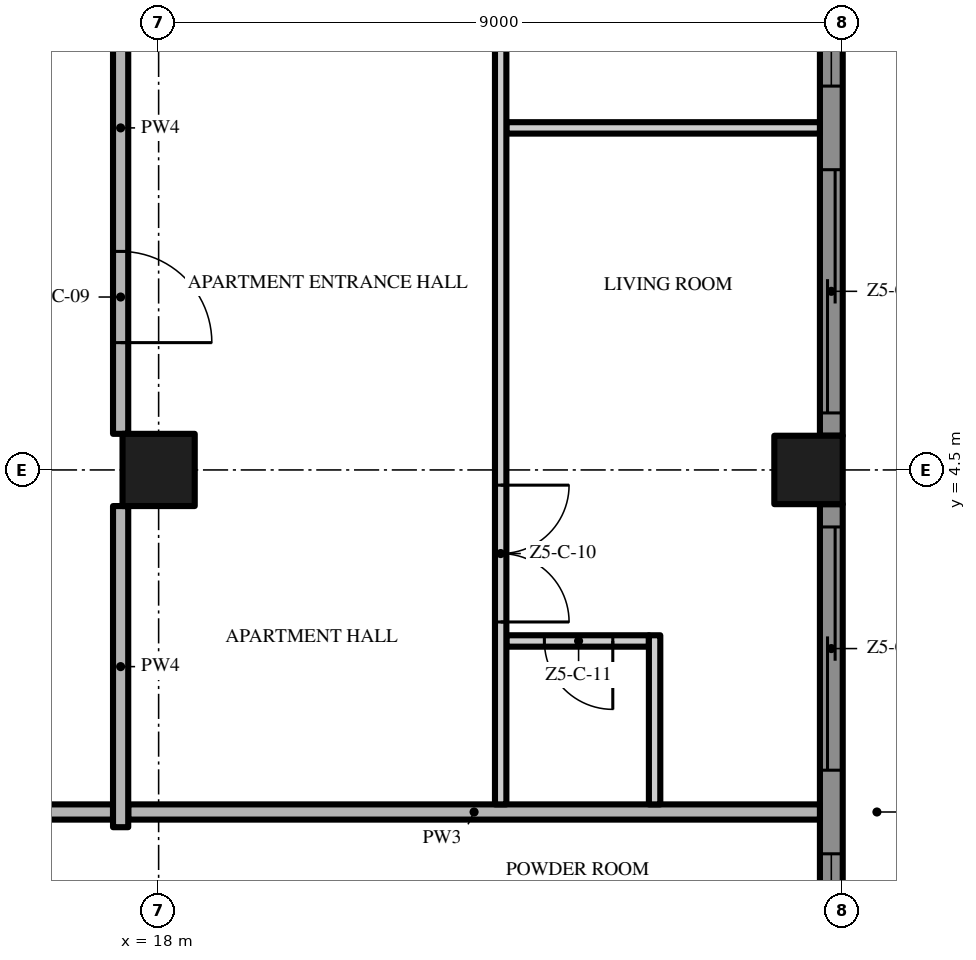
"""IFC4 building model, lengths in metres.
Left out: names, types, materials, properties, quantities, classifications, styles, units other than length and angle.
Written with IfcOpenShell. Run it as: python <this file> out.ifc"""

import sys

from ifc_helpers import new_model, si_unit, direction, frame, frame_2d, origin, origin_2d, place, context, subcontext, project, spatial, polyline, rectangle, outline, extrude, element, fill, save


model = new_model("IFC4")
c1 = context("Model", 3, precision=1e-05, world=origin(), true_north=direction((0.0, 1.0)))
c2 = subcontext(c1, "Body", "Model", "MODEL_VIEW")
j1 = project(units=[si_unit("LENGTHUNIT", "METRE"), si_unit("PLANEANGLEUNIT", "RADIAN")], contexts=[c1])
p1 = place(None, origin())
s1 = spatial("IfcSite", under=j1, at=p1, CompositionType="ELEMENT")
p2 = place(p1, origin())
s2 = spatial("IfcBuilding", under=s1, at=p2, CompositionType="ELEMENT")
p3 = place(p2, frame((0.0, 0.0, 265.4)))
s3 = spatial("IfcBuildingStorey", under=s2, at=p3, CompositionType="ELEMENT", Elevation=265.4)
p4 = place(p3, frame((18.0, 4.5, 0.0), z_axis=(0.0, 0.0, 1.0), x_axis=(1.0, 0.0, 0.0)))
e1 = element("IfcColumn", 1, at=p4, inside=s3, PredefinedType="COLUMN", context=c2, shape_type="SweptSolid", body=[
    extrude(rectangle(XDim=0.95, YDim=0.95, at=origin_2d()), origin(), (0.0, 0.0, 1.0), 3.5),
])
p5 = place(p3, frame((26.55, 4.5, 0.0), z_axis=(0.0, 0.0, 1.0), x_axis=(1.0, 0.0, 0.0)))
e2 = element("IfcColumn", 2, at=p5, inside=s3, PredefinedType="COLUMN", context=c2, shape_type="SweptSolid", body=[
    extrude(rectangle(XDim=0.9, YDim=0.9, at=origin_2d()), origin(), (0.0, 0.0, 1.0), 3.5),
])
p6 = place(p3, frame((26.85, 4.05, 0.0), z_axis=(0.0, 0.0, 1.0), x_axis=(0.0, -1.0, 0.0)))
e3 = element("IfcWall", 3, at=p6, inside=s3, PredefinedType="SOLIDWALL", context=c2, shape_type="SweptSolid", body=[
    extrude(rectangle(XDim=8.1, YDim=0.3, at=frame_2d((4.05, 0.0))), origin(), (0.0, 0.0, 1.0), 3.5),
])
p7 = place(p6, frame((4.6, 0.0, 0.45)))
e4 = element("IfcOpeningElement", 4, at=p7, cuts=e3, PredefinedType="OPENING", context=c2, shape_type="SweptSolid", body=[
    extrude(rectangle(XDim=3.2, YDim=2.65, at=frame_2d((1.6, 1.325))), frame((0.0, 0.16, 0.0), z_axis=(0.0, -1.0, 0.0), x_axis=(1.0, 0.0, 0.0)), (0.0, 0.0, 1.0), 0.32),
])
p8 = place(p6, frame((0.3, 0.0, 0.0)))
e5 = element("IfcOpeningElement", 5, at=p8, cuts=e3, PredefinedType="OPENING", context=c2, shape_type="SweptSolid", body=[
    extrude(rectangle(XDim=3.2, YDim=2.4, at=frame_2d((1.6, 1.2))), frame((0.0, 0.16, 0.0), z_axis=(0.0, -1.0, 0.0), x_axis=(1.0, 0.0, 0.0)), (0.0, 0.0, 1.0), 0.32),
])
p9 = place(p3, frame((26.85, 13.05, 0.0), z_axis=(0.0, 0.0, 1.0), x_axis=(0.0, -1.0, 0.0)))
e6 = element("IfcWall", 6, at=p9, inside=s3, PredefinedType="SOLIDWALL", context=c2, shape_type="SweptSolid", body=[
    extrude(rectangle(XDim=8.1, YDim=0.3, at=frame_2d((4.05, 0.0))), origin(), (0.0, 0.0, 1.0), 3.5),
])
p10 = place(p9, frame((4.6, 0.0, 0.0)))
e7 = element("IfcOpeningElement", 7, at=p10, cuts=e6, PredefinedType="OPENING", context=c2, shape_type="SweptSolid", body=[
    extrude(rectangle(XDim=3.2, YDim=2.4, at=frame_2d((1.6, 1.2))), frame((0.0, 0.16, 0.0), z_axis=(0.0, -1.0, 0.0), x_axis=(1.0, 0.0, 0.0)), (0.0, 0.0, 1.0), 0.32),
])
p11 = place(p9, frame((0.3, 0.0, 0.45)))
e8 = element("IfcOpeningElement", 8, at=p11, cuts=e6, PredefinedType="OPENING", context=c2, shape_type="SweptSolid", body=[
    extrude(rectangle(XDim=3.2, YDim=2.65, at=frame_2d((1.6, 1.325))), frame((0.0, 0.16, 0.0), z_axis=(0.0, -1.0, 0.0), x_axis=(1.0, 0.0, 0.0)), (0.0, 0.0, 1.0), 0.32),
])
p12 = place(p3, origin())
e9 = element("IfcWall", 9, at=p12, inside=s3, PredefinedType="USERDEFINED", context=c2, shape_type="SweptSolid", body=[
    extrude(outline(polyline([(27.6, -18.0), (27.829, -16.5), (28.429, -15.0), (29.171, -13.5), (29.771, -12.0), (30.0, -10.5), (29.771, -9.0), (29.171, -7.5), (28.429, -6.0), (27.829, -4.5), (27.6, -3.0), (27.829, -1.5), (28.429, 0.0), (29.171, 1.5), (29.771, 3.0), (30.0, 4.5), (29.771, 6.0), (29.171, 7.5), (28.429, 9.0), (27.829, 10.5), (27.6, 12.0), (27.829, 13.5), (28.429, 15.0), (29.171, 16.5), (29.771, 18.0), (29.539, 18.093), (28.942, 16.602), (28.201, 15.102), (27.586, 13.566), (27.347, 12.0), (27.586, 10.434), (28.201, 8.898), (28.942, 7.398), (29.528, 5.934), (29.747, 4.5), (29.528, 3.066), (28.942, 1.602), (28.201, 0.102), (27.586, -1.434), (27.347, -3.0), (27.586, -4.566), (28.201, -6.102), (28.942, -7.602), (29.528, -9.066), (29.747, -10.5), (29.528, -11.934), (28.942, -13.398), (28.201, -14.898), (27.586, -16.434), (27.353, -17.962), (27.6, -18.0)])), origin(), (0.0, 0.0, 1.0), 0.9),
])
p13 = place(p3, frame((17.4, 0.0, 0.0), z_axis=(0.0, 0.0, 1.0), x_axis=(-1.0, 0.0, 0.0)))
e10 = element("IfcWall", 10, at=p13, inside=s3, PredefinedType="PARTITIONING", context=c2, shape_type="SweptSolid", body=[
    extrude(rectangle(XDim=34.8, YDim=0.2, at=frame_2d((17.4, 0.0))), origin(), (0.0, 0.0, 1.0), 3.5),
])
p14 = place(p13, frame((23.4, 0.0, 0.0)))
e11 = element("IfcOpeningElement", 11, at=p14, cuts=e10, PredefinedType="OPENING", context=c2, shape_type="SweptSolid", body=[
    extrude(rectangle(XDim=1.5, YDim=2.4, at=frame_2d((0.75, 1.2))), frame((0.0, 0.11, 0.0), z_axis=(0.0, -1.0, 0.0), x_axis=(1.0, 0.0, 0.0)), (0.0, 0.0, 1.0), 0.22),
])
p15 = place(p13, frame((5.4, 0.0, 0.0)))
e12 = element("IfcOpeningElement", 12, at=p15, cuts=e10, PredefinedType="OPENING", context=c2, shape_type="SweptSolid", body=[
    extrude(rectangle(XDim=1.5, YDim=2.4, at=frame_2d((0.75, 1.2))), frame((0.0, 0.11, 0.0), z_axis=(0.0, -1.0, 0.0), x_axis=(1.0, 0.0, 0.0)), (0.0, 0.0, 1.0), 0.22),
])
p16 = place(p3, frame((17.6, 0.0, 0.0), z_axis=(0.0, 0.0, 1.0), x_axis=(1.0, 0.0, 0.0)))
e13 = element("IfcWall", 13, at=p16, inside=s3, PredefinedType="PARTITIONING", context=c2, shape_type="SweptSolid", body=[
    extrude(rectangle(XDim=9.1, YDim=0.2, at=frame_2d((4.55, 0.0))), origin(), (0.0, 0.0, 1.0), 3.5),
])
p17 = place(p3, frame((24.45, 2.25, 0.0), z_axis=(0.0, 0.0, 1.0), x_axis=(-1.0, 0.0, 0.0)))
e14 = element("IfcWall", 14, at=p17, inside=s3, PredefinedType="PARTITIONING", context=c2, shape_type="SweptSolid", body=[
    extrude(rectangle(XDim=1.875, YDim=0.15, at=frame_2d((0.938, 0.0))), origin(), (0.0, 0.0, 1.0), 3.5),
])
p18 = place(p17, frame((0.475, 0.0, 0.0)))
e15 = element("IfcOpeningElement", 15, at=p18, cuts=e14, PredefinedType="OPENING", context=c2, shape_type="SweptSolid", body=[
    extrude(rectangle(XDim=0.9, YDim=2.1, at=frame_2d((0.45, 1.05))), frame((0.0, 0.085, 0.0), z_axis=(0.0, -1.0, 0.0), x_axis=(1.0, 0.0, 0.0)), (0.0, 0.0, 1.0), 0.17),
])
p19 = place(p3, frame((22.575, 9.0, 0.0), z_axis=(0.0, 0.0, 1.0), x_axis=(1.0, 0.0, 0.0)))
e16 = element("IfcWall", 16, at=p19, inside=s3, PredefinedType="PARTITIONING", context=c2, shape_type="SweptSolid", body=[
    extrude(rectangle(XDim=4.125, YDim=0.15, at=frame_2d((2.062, 0.0))), origin(), (0.0, 0.0, 1.0), 3.5),
])
p20 = place(p3, frame((17.5, -0.2, 0.0), z_axis=(0.0, 0.0, 1.0), x_axis=(0.0, 1.0, 0.0)))
e17 = element("IfcWall", 17, at=p20, inside=s3, PredefinedType="PARTITIONING", context=c2, shape_type="SweptSolid", body=[
    extrude(rectangle(XDim=4.225, YDim=0.2, at=frame_2d((2.112, 0.0))), origin(), (0.0, 0.0, 1.0), 3.5),
])
p21 = place(p3, frame((17.5, 13.025, 0.0), z_axis=(0.0, 0.0, 1.0), x_axis=(0.0, -1.0, 0.0)))
e18 = element("IfcWall", 18, at=p21, inside=s3, PredefinedType="PARTITIONING", context=c2, shape_type="SweptSolid", body=[
    extrude(rectangle(XDim=8.05, YDim=0.2, at=frame_2d((4.025, 0.0))), origin(), (0.0, 0.0, 1.0), 3.5),
])
p22 = place(p21, frame((5.65, 0.0, 0.0)))
e19 = element("IfcOpeningElement", 19, at=p22, cuts=e18, PredefinedType="OPENING", context=c2, shape_type="SweptSolid", body=[
    extrude(rectangle(XDim=1.2, YDim=2.4, at=frame_2d((0.6, 1.2))), frame((0.0, 0.11, 0.0), z_axis=(0.0, -1.0, 0.0), x_axis=(1.0, 0.0, 0.0)), (0.0, 0.0, 1.0), 0.22),
])
p23 = place(p3, frame((22.5, 17.55, 0.0), z_axis=(0.0, 0.0, 1.0), x_axis=(0.0, -1.0, 0.0)))
e20 = element("IfcWall", 20, at=p23, inside=s3, PredefinedType="PARTITIONING", context=c2, shape_type="SweptSolid", body=[
    extrude(rectangle(XDim=17.45, YDim=0.15, at=frame_2d((8.725, 0.0))), origin(), (0.0, 0.0, 1.0), 3.5),
])
p24 = place(p23, frame((13.25, 0.0, 0.0)))
e21 = element("IfcOpeningElement", 21, at=p24, cuts=e20, PredefinedType="OPENING", context=c2, shape_type="SweptSolid", body=[
    extrude(rectangle(XDim=1.8, YDim=2.4, at=frame_2d((0.9, 1.2))), frame((0.0, 0.085, 0.0), z_axis=(0.0, -1.0, 0.0), x_axis=(1.0, 0.0, 0.0)), (0.0, 0.0, 1.0), 0.17),
])
p25 = place(p23, frame((5.8, 0.0, 0.0)))
e22 = element("IfcOpeningElement", 22, at=p25, cuts=e20, PredefinedType="OPENING", context=c2, shape_type="SweptSolid", body=[
    extrude(rectangle(XDim=1.0, YDim=2.4, at=frame_2d((0.5, 1.2))), frame((0.0, 0.085, 0.0), z_axis=(0.0, -1.0, 0.0), x_axis=(1.0, 0.0, 0.0)), (0.0, 0.0, 1.0), 0.17),
])
p26 = place(p3, frame((24.525, 0.1, 0.0), z_axis=(0.0, 0.0, 1.0), x_axis=(0.0, 1.0, 0.0)))
e23 = element("IfcWall", 23, at=p26, inside=s3, PredefinedType="PARTITIONING", context=c2, shape_type="SweptSolid", body=[
    extrude(rectangle(XDim=2.225, YDim=0.15, at=frame_2d((1.113, 0.0))), origin(), (0.0, 0.0, 1.0), 3.5),
])
p27 = place(p7, origin())
e24 = element("IfcWindow", 24, at=p27, inside=s3, PartitioningType="SINGLE_PANEL", PredefinedType="WINDOW", context=c2, shape_type="SweptSolid", body=[
    extrude(rectangle(XDim=3.2, YDim=2.65, at=frame_2d((1.6, 1.325))), frame((0.0, 0.03, 0.0), z_axis=(0.0, -1.0, 0.0), x_axis=(1.0, 0.0, 0.0)), (0.0, 0.0, 1.0), 0.06),
])
fill(e4, e24)
p28 = place(p8, origin())
e25 = element("IfcDoor", 25, at=p28, inside=s3, OperationType="SINGLE_SWING_LEFT", PredefinedType="DOOR", context=c2, shape_type="SweptSolid", body=[
    extrude(rectangle(XDim=3.2, YDim=2.4, at=frame_2d((1.6, 1.2))), frame((0.0, 0.025, 0.0), z_axis=(0.0, -1.0, 0.0), x_axis=(1.0, 0.0, 0.0)), (0.0, 0.0, 1.0), 0.05),
])
fill(e5, e25)
p29 = place(p10, origin())
e26 = element("IfcDoor", 26, at=p29, inside=s3, OperationType="SINGLE_SWING_LEFT", PredefinedType="DOOR", context=c2, shape_type="SweptSolid", body=[
    extrude(rectangle(XDim=3.2, YDim=2.4, at=frame_2d((1.6, 1.2))), frame((0.0, 0.025, 0.0), z_axis=(0.0, -1.0, 0.0), x_axis=(1.0, 0.0, 0.0)), (0.0, 0.0, 1.0), 0.05),
])
fill(e7, e26)
p30 = place(p11, origin())
e27 = element("IfcWindow", 27, at=p30, inside=s3, PartitioningType="SINGLE_PANEL", PredefinedType="WINDOW", context=c2, shape_type="SweptSolid", body=[
    extrude(rectangle(XDim=3.2, YDim=2.65, at=frame_2d((1.6, 1.325))), frame((0.0, 0.03, 0.0), z_axis=(0.0, -1.0, 0.0), x_axis=(1.0, 0.0, 0.0)), (0.0, 0.0, 1.0), 0.06),
])
fill(e8, e27)
p31 = place(p22, origin())
e28 = element("IfcDoor", 28, at=p31, inside=s3, OperationType="SINGLE_SWING_RIGHT", PredefinedType="DOOR", context=c2, shape_type="SweptSolid", body=[
    extrude(rectangle(XDim=1.2, YDim=2.4, at=frame_2d((0.6, 1.2))), frame((0.0, 0.025, 0.0), z_axis=(0.0, -1.0, 0.0), x_axis=(1.0, 0.0, 0.0)), (0.0, 0.0, 1.0), 0.05),
])
fill(e19, e28)
p32 = place(p24, origin())
e29 = element("IfcDoor", 29, at=p32, inside=s3, OperationType="DOUBLE_DOOR_SINGLE_SWING", PredefinedType="DOOR", context=c2, shape_type="SweptSolid", body=[
    extrude(rectangle(XDim=1.8, YDim=2.4, at=frame_2d((0.9, 1.2))), frame((0.0, 0.025, 0.0), z_axis=(0.0, -1.0, 0.0), x_axis=(1.0, 0.0, 0.0)), (0.0, 0.0, 1.0), 0.05),
])
fill(e21, e29)
p33 = place(p18, origin())
e30 = element("IfcDoor", 30, at=p33, inside=s3, OperationType="SINGLE_SWING_LEFT", PredefinedType="DOOR", context=c2, shape_type="SweptSolid", body=[
    extrude(rectangle(XDim=0.9, YDim=2.1, at=frame_2d((0.45, 1.05))), frame((0.0, 0.025, 0.0), z_axis=(0.0, -1.0, 0.0), x_axis=(1.0, 0.0, 0.0)), (0.0, 0.0, 1.0), 0.05),
])
fill(e15, e30)
save(model, sys.argv[1])
